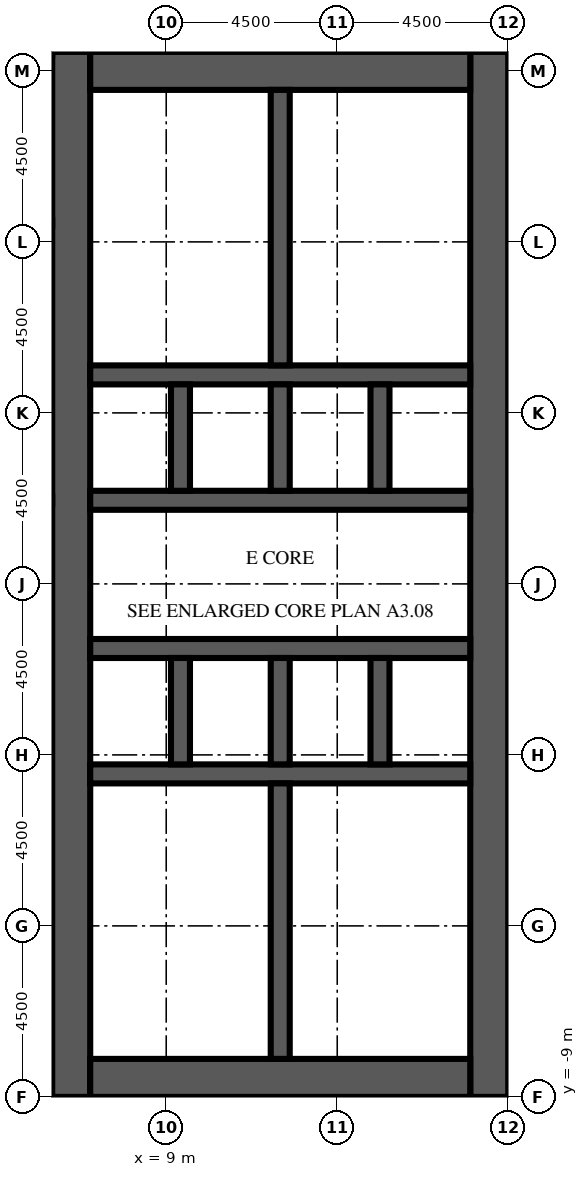
"""IFC4 building model, lengths in metres.
Left out: names, types, materials, properties, quantities, classifications, styles, units other than length and angle.
Written with IfcOpenShell. Run it as: python <this file> out.ifc"""

import sys

from ifc_helpers import new_model, si_unit, direction, frame, frame_2d, origin, place, context, subcontext, project, spatial, rectangle, extrude, element, fill, save


model = new_model("IFC4")
c1 = context("Model", 3, precision=1e-05, world=origin(), true_north=direction((0.0, 1.0)))
c2 = subcontext(c1, "Body", "Model", "MODEL_VIEW")
j1 = project(units=[si_unit("LENGTHUNIT", "METRE"), si_unit("PLANEANGLEUNIT", "RADIAN")], contexts=[c1])
p1 = place(None, origin())
s1 = spatial("IfcSite", under=j1, at=p1, CompositionType="ELEMENT")
p2 = place(p1, origin())
s2 = spatial("IfcBuilding", under=s1, at=p2, CompositionType="ELEMENT")
p3 = place(p2, frame((0.0, 0.0, 41.9)))
s3 = spatial("IfcBuildingStorey", under=s2, at=p3, CompositionType="ELEMENT", Elevation=41.9)
p4 = place(p3, frame((6.5, -9.0, 0.0), z_axis=(0.0, 0.0, 1.0), x_axis=(0.0, 1.0, 0.0)))
e1 = element("IfcWall", 1, at=p4, inside=s3, PredefinedType="SHEAR", context=c2, shape_type="SweptSolid", body=[
    extrude(rectangle(XDim=27.5, YDim=1.0, at=frame_2d((13.75, 0.0))), origin(), (0.0, 0.0, 1.0), 4.1),
])
p5 = place(p4, frame((12.55, 0.0, 0.0)))
e2 = element("IfcOpeningElement", 2, at=p5, cuts=e1, PredefinedType="OPENING", context=c2, shape_type="SweptSolid", body=[
    extrude(rectangle(XDim=2.4, YDim=2.4, at=frame_2d((1.2, 1.2))), frame((0.0, 0.51, 0.0), z_axis=(0.0, -1.0, 0.0), x_axis=(1.0, 0.0, 0.0)), (0.0, 0.0, 1.0), 1.02),
])
p6 = place(p4, frame((4.025, 0.0, 0.0)))
e3 = element("IfcOpeningElement", 3, at=p6, cuts=e1, PredefinedType="OPENING", context=c2, shape_type="SweptSolid", body=[
    extrude(rectangle(XDim=1.2, YDim=2.1, at=frame_2d((0.6, 1.05))), frame((0.0, 0.51, 0.0), z_axis=(0.0, -1.0, 0.0), x_axis=(1.0, 0.0, 0.0)), (0.0, 0.0, 1.0), 1.02),
])
p7 = place(p4, frame((19.475, 0.0, 0.0)))
e4 = element("IfcOpeningElement", 4, at=p7, cuts=e1, PredefinedType="OPENING", context=c2, shape_type="SweptSolid", body=[
    extrude(rectangle(XDim=1.0, YDim=2.1, at=frame_2d((0.5, 1.05))), frame((0.0, 0.51, 0.0), z_axis=(0.0, -1.0, 0.0), x_axis=(1.0, 0.0, 0.0)), (0.0, 0.0, 1.0), 1.02),
])
p8 = place(p4, frame((21.106, 0.0, 0.0)))
e5 = element("IfcOpeningElement", 5, at=p8, cuts=e1, PredefinedType="OPENING", context=c2, shape_type="SweptSolid", body=[
    extrude(rectangle(XDim=1.0, YDim=2.1, at=frame_2d((0.5, 1.05))), frame((0.0, 0.51, 0.0), z_axis=(0.0, -1.0, 0.0), x_axis=(1.0, 0.0, 0.0)), (0.0, 0.0, 1.0), 1.02),
])
p9 = place(p4, frame((23.1, 0.0, 0.0)))
e6 = element("IfcOpeningElement", 6, at=p9, cuts=e1, PredefinedType="OPENING", context=c2, shape_type="SweptSolid", body=[
    extrude(rectangle(XDim=1.0, YDim=2.1, at=frame_2d((0.5, 1.05))), frame((0.0, 0.51, 0.0), z_axis=(0.0, -1.0, 0.0), x_axis=(1.0, 0.0, 0.0)), (0.0, 0.0, 1.0), 1.02),
])
p10 = place(p4, frame((25.094, 0.0, 0.0)))
e7 = element("IfcOpeningElement", 7, at=p10, cuts=e1, PredefinedType="OPENING", context=c2, shape_type="SweptSolid", body=[
    extrude(rectangle(XDim=1.0, YDim=2.1, at=frame_2d((0.5, 1.05))), frame((0.0, 0.51, 0.0), z_axis=(0.0, -1.0, 0.0), x_axis=(1.0, 0.0, 0.0)), (0.0, 0.0, 1.0), 1.02),
])
p11 = place(p3, frame((17.5, -9.0, 0.0), z_axis=(0.0, 0.0, 1.0), x_axis=(0.0, 1.0, 0.0)))
e8 = element("IfcWall", 8, at=p11, inside=s3, PredefinedType="SHEAR", context=c2, shape_type="SweptSolid", body=[
    extrude(rectangle(XDim=27.5, YDim=1.0, at=frame_2d((13.75, 0.0))), origin(), (0.0, 0.0, 1.0), 4.1),
])
p12 = place(p11, frame((12.55, 0.0, 0.0)))
e9 = element("IfcOpeningElement", 9, at=p12, cuts=e8, PredefinedType="OPENING", context=c2, shape_type="SweptSolid", body=[
    extrude(rectangle(XDim=2.4, YDim=2.4, at=frame_2d((1.2, 1.2))), frame((0.0, 0.51, 0.0), z_axis=(0.0, -1.0, 0.0), x_axis=(1.0, 0.0, 0.0)), (0.0, 0.0, 1.0), 1.02),
])
p13 = place(p11, frame((6.825, 0.0, 0.0)))
e10 = element("IfcOpeningElement", 10, at=p13, cuts=e8, PredefinedType="OPENING", context=c2, shape_type="SweptSolid", body=[
    extrude(rectangle(XDim=1.2, YDim=2.1, at=frame_2d((0.6, 1.05))), frame((0.0, 0.51, 0.0), z_axis=(0.0, -1.0, 0.0), x_axis=(1.0, 0.0, 0.0)), (0.0, 0.0, 1.0), 1.02),
])
p14 = place(p11, frame((19.475, 0.0, 0.0)))
e11 = element("IfcOpeningElement", 11, at=p14, cuts=e8, PredefinedType="OPENING", context=c2, shape_type="SweptSolid", body=[
    extrude(rectangle(XDim=1.2, YDim=2.1, at=frame_2d((0.6, 1.05))), frame((0.0, 0.51, 0.0), z_axis=(0.0, -1.0, 0.0), x_axis=(1.0, 0.0, 0.0)), (0.0, 0.0, 1.0), 1.02),
])
for number, where, z_axis, x_axis in (
    (12, (7.0, -8.5, 0.0), (0.0, 0.0, 1.0), (1.0, 0.0, 0.0)),
    (13, (7.0, 18.0, 0.0), (0.0, 0.0, 1.0), (1.0, 0.0, 0.0)),
):
    element("IfcWall", number, at=place(p3, frame(where, z_axis=z_axis, x_axis=x_axis)), inside=s3, PredefinedType="SHEAR", context=c2, shape_type="SweptSolid", body=[
        extrude(rectangle(XDim=10.0, YDim=1.0, at=frame_2d((5.0, 0.0))), origin(), (0.0, 0.0, 1.0), 4.1),
    ])
p15 = place(p3, frame((7.0, -0.5, 0.0), z_axis=(0.0, 0.0, 1.0), x_axis=(1.0, 0.0, 0.0)))
e14 = element("IfcWall", 14, at=p15, inside=s3, PredefinedType="SHEAR", context=c2, shape_type="SweptSolid", body=[
    extrude(rectangle(XDim=10.0, YDim=0.5, at=frame_2d((5.0, 0.0))), origin(), (0.0, 0.0, 1.0), 4.1),
])
p16 = place(p3, frame((7.0, 2.8, 0.0), z_axis=(0.0, 0.0, 1.0), x_axis=(1.0, 0.0, 0.0)))
e15 = element("IfcWall", 15, at=p16, inside=s3, PredefinedType="SHEAR", context=c2, shape_type="SweptSolid", body=[
    extrude(rectangle(XDim=10.0, YDim=0.5, at=frame_2d((5.0, 0.0))), origin(), (0.0, 0.0, 1.0), 4.1),
])
p17 = place(p16, frame((0.512, 0.0, 0.0)))
e16 = element("IfcOpeningElement", 16, at=p17, cuts=e15, PredefinedType="OPENING", context=c2, shape_type="SweptSolid", body=[
    extrude(rectangle(XDim=1.1, YDim=2.1, at=frame_2d((0.55, 1.05))), frame((0.0, 0.26, 0.0), z_axis=(0.0, -1.0, 0.0), x_axis=(1.0, 0.0, 0.0)), (0.0, 0.0, 1.0), 0.52),
])
p18 = place(p16, frame((3.137, 0.0, 0.0)))
e17 = element("IfcOpeningElement", 17, at=p18, cuts=e15, PredefinedType="OPENING", context=c2, shape_type="SweptSolid", body=[
    extrude(rectangle(XDim=1.1, YDim=2.1, at=frame_2d((0.55, 1.05))), frame((0.0, 0.26, 0.0), z_axis=(0.0, -1.0, 0.0), x_axis=(1.0, 0.0, 0.0)), (0.0, 0.0, 1.0), 0.52),
])
p19 = place(p16, frame((8.387, 0.0, 0.0)))
e18 = element("IfcOpeningElement", 18, at=p19, cuts=e15, PredefinedType="OPENING", context=c2, shape_type="SweptSolid", body=[
    extrude(rectangle(XDim=1.1, YDim=2.1, at=frame_2d((0.55, 1.05))), frame((0.0, 0.26, 0.0), z_axis=(0.0, -1.0, 0.0), x_axis=(1.0, 0.0, 0.0)), (0.0, 0.0, 1.0), 0.52),
])
p20 = place(p3, frame((7.0, 6.7, 0.0), z_axis=(0.0, 0.0, 1.0), x_axis=(1.0, 0.0, 0.0)))
e19 = element("IfcWall", 19, at=p20, inside=s3, PredefinedType="SHEAR", context=c2, shape_type="SweptSolid", body=[
    extrude(rectangle(XDim=10.0, YDim=0.5, at=frame_2d((5.0, 0.0))), origin(), (0.0, 0.0, 1.0), 4.1),
])
p21 = place(p20, frame((0.512, 0.0, 0.0)))
e20 = element("IfcOpeningElement", 20, at=p21, cuts=e19, PredefinedType="OPENING", context=c2, shape_type="SweptSolid", body=[
    extrude(rectangle(XDim=1.1, YDim=2.1, at=frame_2d((0.55, 1.05))), frame((0.0, 0.26, 0.0), z_axis=(0.0, -1.0, 0.0), x_axis=(1.0, 0.0, 0.0)), (0.0, 0.0, 1.0), 0.52),
])
p22 = place(p20, frame((3.188, 0.0, 0.0)))
e21 = element("IfcOpeningElement", 21, at=p22, cuts=e19, PredefinedType="OPENING", context=c2, shape_type="SweptSolid", body=[
    extrude(rectangle(XDim=1.0, YDim=2.1, at=frame_2d((0.5, 1.05))), frame((0.0, 0.26, 0.0), z_axis=(0.0, -1.0, 0.0), x_axis=(1.0, 0.0, 0.0)), (0.0, 0.0, 1.0), 0.52),
])
p23 = place(p20, frame((5.812, 0.0, 0.0)))
e22 = element("IfcOpeningElement", 22, at=p23, cuts=e19, PredefinedType="OPENING", context=c2, shape_type="SweptSolid", body=[
    extrude(rectangle(XDim=1.0, YDim=2.1, at=frame_2d((0.5, 1.05))), frame((0.0, 0.26, 0.0), z_axis=(0.0, -1.0, 0.0), x_axis=(1.0, 0.0, 0.0)), (0.0, 0.0, 1.0), 0.52),
])
p24 = place(p20, frame((8.438, 0.0, 0.0)))
e23 = element("IfcOpeningElement", 23, at=p24, cuts=e19, PredefinedType="OPENING", context=c2, shape_type="SweptSolid", body=[
    extrude(rectangle(XDim=1.0, YDim=2.1, at=frame_2d((0.5, 1.05))), frame((0.0, 0.26, 0.0), z_axis=(0.0, -1.0, 0.0), x_axis=(1.0, 0.0, 0.0)), (0.0, 0.0, 1.0), 0.52),
])
p25 = place(p3, frame((7.0, 10.0, 0.0), z_axis=(0.0, 0.0, 1.0), x_axis=(1.0, 0.0, 0.0)))
e24 = element("IfcWall", 24, at=p25, inside=s3, PredefinedType="SHEAR", context=c2, shape_type="SweptSolid", body=[
    extrude(rectangle(XDim=10.0, YDim=0.5, at=frame_2d((5.0, 0.0))), origin(), (0.0, 0.0, 1.0), 4.1),
])
for number, where, z_axis, x_axis in (
    (25, (9.375, -0.25, 0.0), (0.0, 0.0, 1.0), (0.0, 1.0, 0.0)),
    (26, (9.375, 6.95, 0.0), (0.0, 0.0, 1.0), (0.0, 1.0, 0.0)),
    (27, (12.0, -0.25, 0.0), (0.0, 0.0, 1.0), (0.0, 1.0, 0.0)),
    (28, (12.0, 6.95, 0.0), (0.0, 0.0, 1.0), (0.0, 1.0, 0.0)),
    (29, (14.625, -0.25, 0.0), (0.0, 0.0, 1.0), (0.0, 1.0, 0.0)),
    (30, (14.625, 6.95, 0.0), (0.0, 0.0, 1.0), (0.0, 1.0, 0.0)),
):
    element("IfcWall", number, at=place(p3, frame(where, z_axis=z_axis, x_axis=x_axis)), inside=s3, PredefinedType="SHEAR", context=c2, shape_type="SweptSolid", body=[
        extrude(rectangle(XDim=2.8, YDim=0.5, at=frame_2d((1.4, 0.0))), origin(), (0.0, 0.0, 1.0), 4.1),
    ])
for number, where, z_axis, x_axis in (
    (31, (12.0, -8.0, 0.0), (0.0, 0.0, 1.0), (0.0, 1.0, 0.0)),
    (32, (12.0, 10.25, 0.0), (0.0, 0.0, 1.0), (0.0, 1.0, 0.0)),
):
    element("IfcWall", number, at=place(p3, frame(where, z_axis=z_axis, x_axis=x_axis)), inside=s3, PredefinedType="SHEAR", context=c2, shape_type="SweptSolid", body=[
        extrude(rectangle(XDim=7.25, YDim=0.5, at=frame_2d((3.625, 0.0))), origin(), (0.0, 0.0, 1.0), 4.1),
    ])
p26 = place(p3, frame((7.0, -5.825, 0.0), z_axis=(0.0, 0.0, 1.0), x_axis=(1.0, 0.0, 0.0)))
e33 = element("IfcWall", 33, at=p26, inside=s3, PredefinedType="PARTITIONING", context=c2, shape_type="SweptSolid", body=[
    extrude(rectangle(XDim=1.6, YDim=0.1, at=frame_2d((0.8, 0.0))), origin(), (0.0, 0.0, 1.0), 3.65),
])
p27 = place(p26, frame((0.3, 0.0, 0.0)))
e34 = element("IfcOpeningElement", 34, at=p27, cuts=e33, PredefinedType="OPENING", context=c2, shape_type="SweptSolid", body=[
    extrude(rectangle(XDim=1.0, YDim=2.1, at=frame_2d((0.5, 1.05))), frame((0.0, 0.06, 0.0), z_axis=(0.0, -1.0, 0.0), x_axis=(1.0, 0.0, 0.0)), (0.0, 0.0, 1.0), 0.12),
])
p28 = place(p3, frame((7.0, -2.925, 0.0), z_axis=(0.0, 0.0, 1.0), x_axis=(1.0, 0.0, 0.0)))
e35 = element("IfcWall", 35, at=p28, inside=s3, PredefinedType="PARTITIONING", context=c2, shape_type="SweptSolid", body=[
    extrude(rectangle(XDim=1.6, YDim=0.1, at=frame_2d((0.8, 0.0))), origin(), (0.0, 0.0, 1.0), 3.65),
])
p29 = place(p28, frame((0.3, 0.0, 0.0)))
e36 = element("IfcOpeningElement", 36, at=p29, cuts=e35, PredefinedType="OPENING", context=c2, shape_type="SweptSolid", body=[
    extrude(rectangle(XDim=1.0, YDim=2.1, at=frame_2d((0.5, 1.05))), frame((0.0, 0.06, 0.0), z_axis=(0.0, -1.0, 0.0), x_axis=(1.0, 0.0, 0.0)), (0.0, 0.0, 1.0), 0.12),
])
p30 = place(p3, frame((8.6, -5.825, 0.0), z_axis=(0.0, 0.0, 1.0), x_axis=(0.0, 1.0, 0.0)))
e37 = element("IfcWall", 37, at=p30, inside=s3, PredefinedType="PARTITIONING", context=c2, shape_type="SweptSolid", body=[
    extrude(rectangle(XDim=2.9, YDim=0.1, at=frame_2d((1.45, 0.0))), origin(), (0.0, 0.0, 1.0), 3.65),
])
p31 = place(p30, frame((0.95, 0.0, 0.0)))
e38 = element("IfcOpeningElement", 38, at=p31, cuts=e37, PredefinedType="OPENING", context=c2, shape_type="SweptSolid", body=[
    extrude(rectangle(XDim=1.0, YDim=2.1, at=frame_2d((0.5, 1.05))), frame((0.0, 0.06, 0.0), z_axis=(0.0, -1.0, 0.0), x_axis=(1.0, 0.0, 0.0)), (0.0, 0.0, 1.0), 0.12),
])
for number, where, z_axis, x_axis in (
    (39, (8.6, -5.825, 0.0), (0.0, 0.0, 1.0), (1.0, 0.0, 0.0)),
    (40, (8.6, -2.925, 0.0), (0.0, 0.0, 1.0), (1.0, 0.0, 0.0)),
):
    element("IfcWall", number, at=place(p3, frame(where, z_axis=z_axis, x_axis=x_axis)), inside=s3, PredefinedType="PARTITIONING", context=c2, shape_type="SweptSolid", body=[
        extrude(rectangle(XDim=3.15, YDim=0.1, at=frame_2d((1.575, 0.0))), origin(), (0.0, 0.0, 1.0), 3.65),
    ])
for number, where, z_axis, x_axis in (
    (41, (7.0, 11.7, 0.0), (0.0, 0.0, 1.0), (1.0, 0.0, 0.0)),
    (42, (7.0, 13.512, 0.0), (0.0, 0.0, 1.0), (1.0, 0.0, 0.0)),
    (43, (7.0, 15.688, 0.0), (0.0, 0.0, 1.0), (1.0, 0.0, 0.0)),
):
    element("IfcWall", number, at=place(p3, frame(where, z_axis=z_axis, x_axis=x_axis)), inside=s3, PredefinedType="PARTITIONING", context=c2, shape_type="SweptSolid", body=[
        extrude(rectangle(XDim=4.75, YDim=0.1, at=frame_2d((2.375, 0.0))), origin(), (0.0, 0.0, 1.0), 3.65),
    ])
p32 = place(p17, origin())
e44 = element("IfcDoor", 44, at=p32, inside=s3, OperationType="DOUBLE_DOOR_SLIDING", PredefinedType="DOOR", context=c2, shape_type="SweptSolid", body=[
    extrude(rectangle(XDim=1.1, YDim=2.1, at=frame_2d((0.55, 1.05))), frame((0.0, 0.025, 0.0), z_axis=(0.0, -1.0, 0.0), x_axis=(1.0, 0.0, 0.0)), (0.0, 0.0, 1.0), 0.05),
])
fill(e16, e44)
p33 = place(p18, origin())
e45 = element("IfcDoor", 45, at=p33, inside=s3, OperationType="DOUBLE_DOOR_SLIDING", PredefinedType="DOOR", context=c2, shape_type="SweptSolid", body=[
    extrude(rectangle(XDim=1.1, YDim=2.1, at=frame_2d((0.55, 1.05))), frame((0.0, 0.025, 0.0), z_axis=(0.0, -1.0, 0.0), x_axis=(1.0, 0.0, 0.0)), (0.0, 0.0, 1.0), 0.05),
])
fill(e17, e45)
p34 = place(p19, origin())
e46 = element("IfcDoor", 46, at=p34, inside=s3, OperationType="DOUBLE_DOOR_SLIDING", PredefinedType="DOOR", context=c2, shape_type="SweptSolid", body=[
    extrude(rectangle(XDim=1.1, YDim=2.1, at=frame_2d((0.55, 1.05))), frame((0.0, 0.025, 0.0), z_axis=(0.0, -1.0, 0.0), x_axis=(1.0, 0.0, 0.0)), (0.0, 0.0, 1.0), 0.05),
])
fill(e18, e46)
p35 = place(p21, origin())
e47 = element("IfcDoor", 47, at=p35, inside=s3, OperationType="DOUBLE_DOOR_SLIDING", PredefinedType="DOOR", context=c2, shape_type="SweptSolid", body=[
    extrude(rectangle(XDim=1.1, YDim=2.1, at=frame_2d((0.55, 1.05))), frame((0.0, 0.025, 0.0), z_axis=(0.0, -1.0, 0.0), x_axis=(1.0, 0.0, 0.0)), (0.0, 0.0, 1.0), 0.05),
])
fill(e20, e47)
p36 = place(p5, origin())
e48 = element("IfcDoor", 48, at=p36, inside=s3, OperationType="DOUBLE_DOOR_DOUBLE_SWING", PredefinedType="DOOR", context=c2, shape_type="SweptSolid", body=[
    extrude(rectangle(XDim=2.4, YDim=2.4, at=frame_2d((1.2, 1.2))), frame((0.0, 0.025, 0.0), z_axis=(0.0, -1.0, 0.0), x_axis=(1.0, 0.0, 0.0)), (0.0, 0.0, 1.0), 0.05),
])
fill(e2, e48)
p37 = place(p12, origin())
e49 = element("IfcDoor", 49, at=p37, inside=s3, OperationType="DOUBLE_DOOR_DOUBLE_SWING", PredefinedType="DOOR", context=c2, shape_type="SweptSolid", body=[
    extrude(rectangle(XDim=2.4, YDim=2.4, at=frame_2d((1.2, 1.2))), frame((0.0, 0.025, 0.0), z_axis=(0.0, -1.0, 0.0), x_axis=(1.0, 0.0, 0.0)), (0.0, 0.0, 1.0), 0.05),
])
fill(e9, e49)
p38 = place(p13, frame((1.2, 0.0, 0.0), z_axis=(0.0, 0.0, 1.0), x_axis=(-1.0, 0.0, 0.0)))
e50 = element("IfcDoor", 50, at=p38, inside=s3, OperationType="SINGLE_SWING_LEFT", PredefinedType="DOOR", context=c2, shape_type="SweptSolid", body=[
    extrude(rectangle(XDim=1.2, YDim=2.1, at=frame_2d((0.6, 1.05))), frame((0.0, 0.025, 0.0), z_axis=(0.0, -1.0, 0.0), x_axis=(1.0, 0.0, 0.0)), (0.0, 0.0, 1.0), 0.05),
])
fill(e10, e50)
p39 = place(p14, frame((1.2, 0.0, 0.0), z_axis=(0.0, 0.0, 1.0), x_axis=(-1.0, 0.0, 0.0)))
e51 = element("IfcDoor", 51, at=p39, inside=s3, OperationType="SINGLE_SWING_LEFT", PredefinedType="DOOR", context=c2, shape_type="SweptSolid", body=[
    extrude(rectangle(XDim=1.2, YDim=2.1, at=frame_2d((0.6, 1.05))), frame((0.0, 0.025, 0.0), z_axis=(0.0, -1.0, 0.0), x_axis=(1.0, 0.0, 0.0)), (0.0, 0.0, 1.0), 0.05),
])
fill(e11, e51)
p40 = place(p22, origin())
e52 = element("IfcDoor", 52, at=p40, inside=s3, OperationType="SINGLE_SWING_RIGHT", PredefinedType="DOOR", context=c2, shape_type="SweptSolid", body=[
    extrude(rectangle(XDim=1.0, YDim=2.1, at=frame_2d((0.5, 1.05))), frame((0.0, 0.025, 0.0), z_axis=(0.0, -1.0, 0.0), x_axis=(1.0, 0.0, 0.0)), (0.0, 0.0, 1.0), 0.05),
])
fill(e21, e52)
p41 = place(p23, origin())
e53 = element("IfcDoor", 53, at=p41, inside=s3, OperationType="SINGLE_SWING_LEFT", PredefinedType="DOOR", context=c2, shape_type="SweptSolid", body=[
    extrude(rectangle(XDim=1.0, YDim=2.1, at=frame_2d((0.5, 1.05))), frame((0.0, 0.025, 0.0), z_axis=(0.0, -1.0, 0.0), x_axis=(1.0, 0.0, 0.0)), (0.0, 0.0, 1.0), 0.05),
])
fill(e22, e53)
p42 = place(p24, origin())
e54 = element("IfcDoor", 54, at=p42, inside=s3, OperationType="SINGLE_SWING_RIGHT", PredefinedType="DOOR", context=c2, shape_type="SweptSolid", body=[
    extrude(rectangle(XDim=1.0, YDim=2.1, at=frame_2d((0.5, 1.05))), frame((0.0, 0.025, 0.0), z_axis=(0.0, -1.0, 0.0), x_axis=(1.0, 0.0, 0.0)), (0.0, 0.0, 1.0), 0.05),
])
fill(e23, e54)
p43 = place(p6, origin())
e55 = element("IfcDoor", 55, at=p43, inside=s3, OperationType="SINGLE_SWING_RIGHT", PredefinedType="DOOR", context=c2, shape_type="SweptSolid", body=[
    extrude(rectangle(XDim=1.2, YDim=2.1, at=frame_2d((0.6, 1.05))), frame((0.0, -0.425, 0.0), z_axis=(0.0, -1.0, 0.0), x_axis=(1.0, 0.0, 0.0)), (0.0, 0.0, 1.0), 0.05),
])
fill(e3, e55)
p44 = place(p27, origin())
e56 = element("IfcDoor", 56, at=p44, inside=s3, OperationType="SINGLE_SWING_LEFT", PredefinedType="DOOR", context=c2, shape_type="SweptSolid", body=[
    extrude(rectangle(XDim=1.0, YDim=2.1, at=frame_2d((0.5, 1.05))), frame((0.0, 0.025, 0.0), z_axis=(0.0, -1.0, 0.0), x_axis=(1.0, 0.0, 0.0)), (0.0, 0.0, 1.0), 0.05),
])
fill(e34, e56)
p45 = place(p29, origin())
e57 = element("IfcDoor", 57, at=p45, inside=s3, OperationType="SINGLE_SWING_RIGHT", PredefinedType="DOOR", context=c2, shape_type="SweptSolid", body=[
    extrude(rectangle(XDim=1.0, YDim=2.1, at=frame_2d((0.5, 1.05))), frame((0.0, 0.025, 0.0), z_axis=(0.0, -1.0, 0.0), x_axis=(1.0, 0.0, 0.0)), (0.0, 0.0, 1.0), 0.05),
])
fill(e36, e57)
p46 = place(p31, origin())
e58 = element("IfcDoor", 58, at=p46, inside=s3, OperationType="SINGLE_SWING_LEFT", PredefinedType="DOOR", context=c2, shape_type="SweptSolid", body=[
    extrude(rectangle(XDim=1.0, YDim=2.1, at=frame_2d((0.5, 1.05))), frame((0.0, 0.025, 0.0), z_axis=(0.0, -1.0, 0.0), x_axis=(1.0, 0.0, 0.0)), (0.0, 0.0, 1.0), 0.05),
])
fill(e38, e58)
p47 = place(p7, origin())
e59 = element("IfcDoor", 59, at=p47, inside=s3, OperationType="SINGLE_SWING_RIGHT", PredefinedType="DOOR", context=c2, shape_type="SweptSolid", body=[
    extrude(rectangle(XDim=1.0, YDim=2.1, at=frame_2d((0.5, 1.05))), frame((0.0, -0.425, 0.0), z_axis=(0.0, -1.0, 0.0), x_axis=(1.0, 0.0, 0.0)), (0.0, 0.0, 1.0), 0.05),
])
fill(e4, e59)
p48 = place(p8, origin())
e60 = element("IfcDoor", 60, at=p48, inside=s3, OperationType="SINGLE_SWING_LEFT", PredefinedType="DOOR", context=c2, shape_type="SweptSolid", body=[
    extrude(rectangle(XDim=1.0, YDim=2.1, at=frame_2d((0.5, 1.05))), frame((0.0, -0.425, 0.0), z_axis=(0.0, -1.0, 0.0), x_axis=(1.0, 0.0, 0.0)), (0.0, 0.0, 1.0), 0.05),
])
fill(e5, e60)
p49 = place(p9, origin())
e61 = element("IfcDoor", 61, at=p49, inside=s3, OperationType="SINGLE_SWING_RIGHT", PredefinedType="DOOR", context=c2, shape_type="SweptSolid", body=[
    extrude(rectangle(XDim=1.0, YDim=2.1, at=frame_2d((0.5, 1.05))), frame((0.0, -0.425, 0.0), z_axis=(0.0, -1.0, 0.0), x_axis=(1.0, 0.0, 0.0)), (0.0, 0.0, 1.0), 0.05),
])
fill(e6, e61)
p50 = place(p10, origin())
e62 = element("IfcDoor", 62, at=p50, inside=s3, OperationType="SINGLE_SWING_LEFT", PredefinedType="DOOR", context=c2, shape_type="SweptSolid", body=[
    extrude(rectangle(XDim=1.0, YDim=2.1, at=frame_2d((0.5, 1.05))), frame((0.0, -0.425, 0.0), z_axis=(0.0, -1.0, 0.0), x_axis=(1.0, 0.0, 0.0)), (0.0, 0.0, 1.0), 0.05),
])
fill(e7, e62)
save(model, sys.argv[1])
